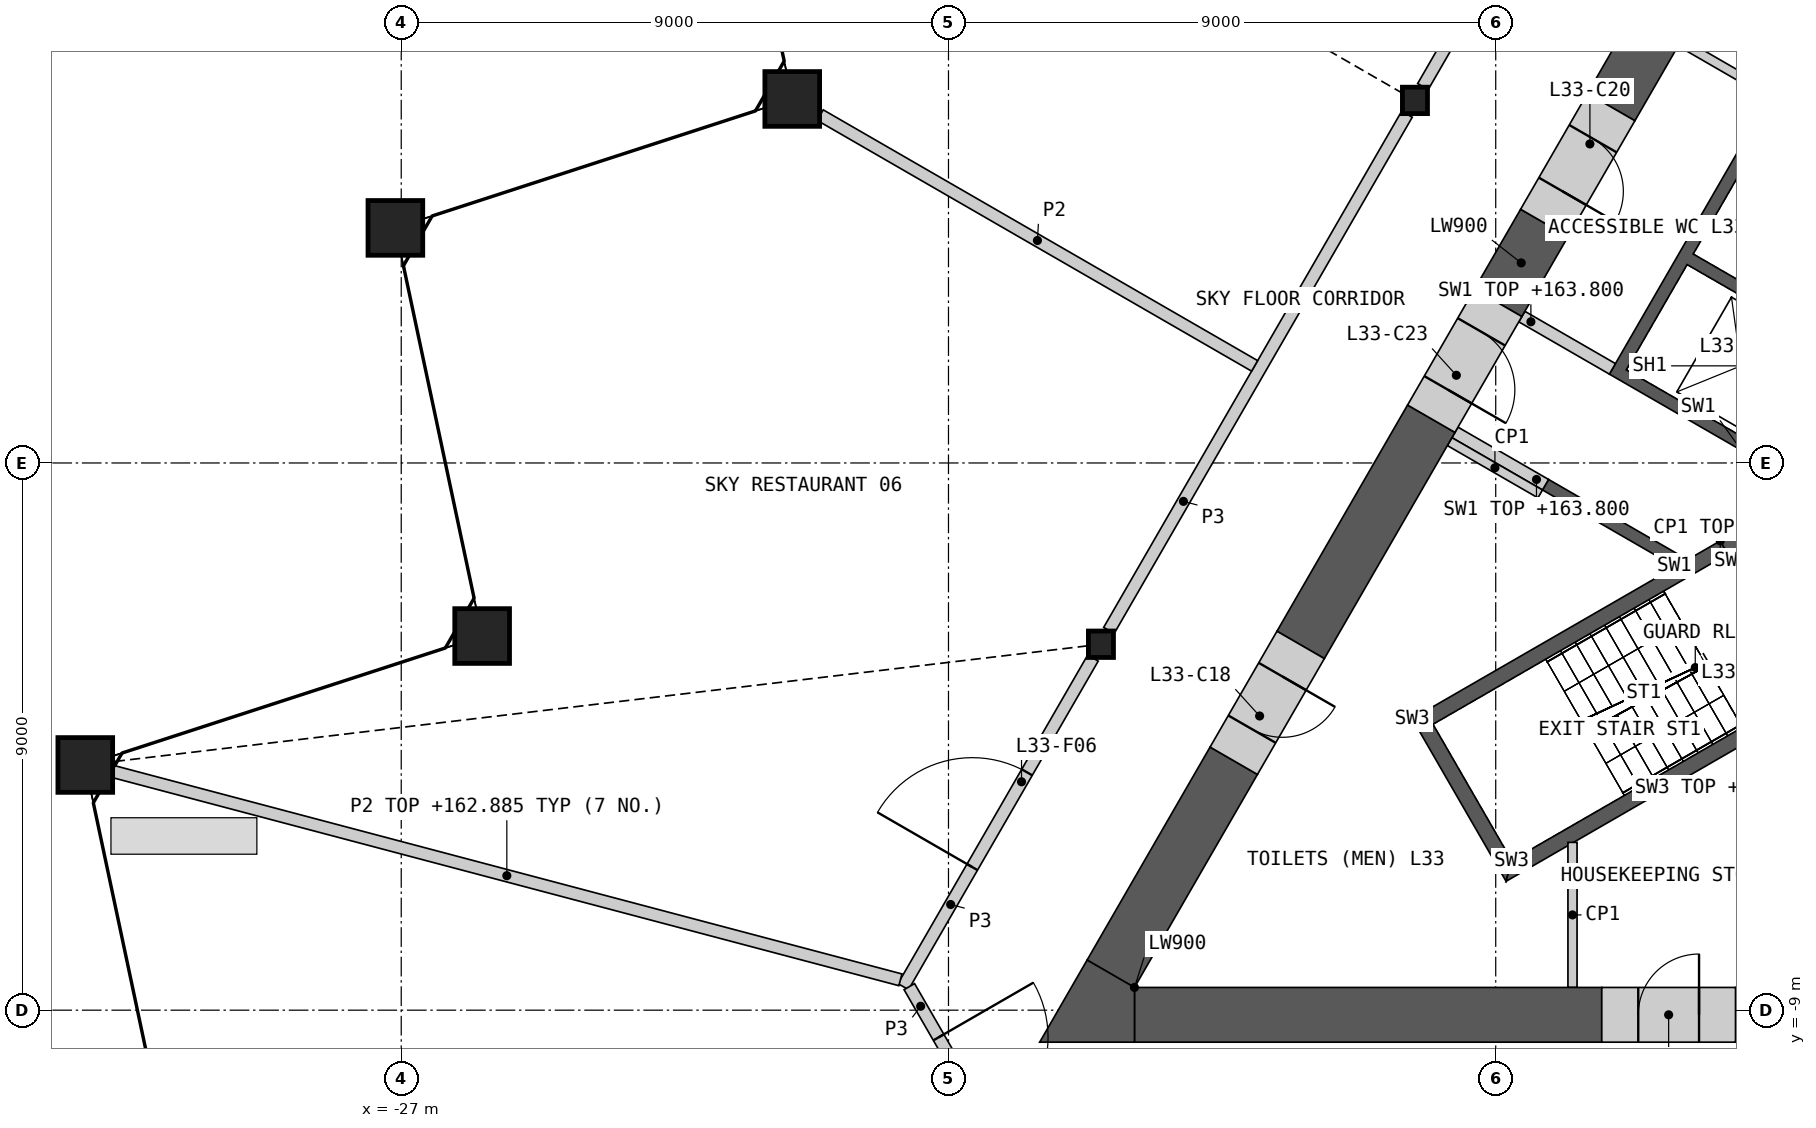
"""IFC4 building model, lengths in metres.
Left out: names, types, materials, properties, quantities, classifications, styles, units other than length and angle.
Written with IfcOpenShell. Run it as: python <this file> out.ifc"""

import sys

from ifc_helpers import new_model, si_unit, direction, frame, frame_2d, origin, origin_2d, place, context, subcontext, project, spatial, polyline, rectangle, hollow_rectangle, i_section, outline, extrude, element, fill, save


model = new_model("IFC4")
c1 = context("Model", 3, precision=1e-05, world=origin(), true_north=direction((0.0, 1.0)))
c2 = subcontext(c1, "Body", "Model", "MODEL_VIEW")
j1 = project(units=[si_unit("LENGTHUNIT", "METRE"), si_unit("PLANEANGLEUNIT", "RADIAN")], contexts=[c1])
p1 = place(None, origin())
s1 = spatial("IfcSite", under=j1, at=p1, CompositionType="ELEMENT")
p2 = place(p1, origin())
s2 = spatial("IfcBuilding", under=s1, at=p2, CompositionType="ELEMENT")
p3 = place(p2, frame((0.0, 0.0, 154.2)))
s3 = spatial("IfcBuildingStorey", under=s2, at=p3, CompositionType="ELEMENT", Elevation=154.2)
for number, where, z_axis, x_axis in (
    (1, (-20.57, 5.987, 0.0), (0.0, 0.0, 1.0), (1.0, 0.0, 0.0)),
    (2, (-27.096, 3.866, 0.0), (0.0, 0.0, 1.0), (1.0, 0.0, 0.0)),
    (3, (-25.669, -2.846, 0.0), (0.0, 0.0, 1.0), (1.0, 0.0, 0.0)),
    (4, (-32.196, -4.967, 0.0), (0.0, 0.0, 1.0), (1.0, 0.0, 0.0)),
):
    element("IfcColumn", number, at=place(p3, frame(where, z_axis=z_axis, x_axis=x_axis)), inside=s3, PredefinedType="COLUMN", context=c2, shape_type="SweptSolid", body=[
        extrude(hollow_rectangle(XDim=0.9, YDim=0.9, WallThickness=0.06, at=origin_2d()), origin(), (0.0, 0.0, 1.0), 10.0),
    ])
for number, where, z_axis, x_axis in (
    (5, (-10.328, 5.963, 0.0), (0.0, 0.0, 1.0), (1.0, 0.0, 0.0)),
    (6, (-15.493, -2.982, 0.0), (0.0, 0.0, 1.0), (1.0, 0.0, 0.0)),
):
    element("IfcColumn", number, at=place(p3, frame(where, z_axis=z_axis, x_axis=x_axis)), inside=s3, PredefinedType="COLUMN", context=c2, shape_type="SweptSolid", body=[
        extrude(i_section(OverallWidth=0.412, OverallDepth=0.435, WebThickness=0.036, FlangeThickness=0.057, at=origin_2d()), origin(), (0.0, 0.0, 1.0), 10.0),
    ])
p4 = place(p3, origin())
e7 = element("IfcWall", 7, at=p4, inside=s3, PredefinedType="SHEAR", context=c2, shape_type="SweptSolid", body=[
    extrude(outline(polyline([(-6.061, -1.697), (-8.231, -0.444), (-8.131, -0.271), (-5.96, -1.524), (-6.061, -1.697)])), origin(), (0.0, 0.0, 1.0), 9.6),
])
p5 = place(p3, origin())
e8 = element("IfcWall", 8, at=p5, inside=s3, PredefinedType="SHEAR", context=c2, shape_type="SweptSolid", body=[
    extrude(outline(polyline([(-4.96, 0.208), (-7.131, 1.461), (-3.731, 7.35), (-1.561, 6.097), (-1.66, 5.924), (-3.652, 7.074), (-4.652, 5.342), (-2.66, 4.192), (-2.76, 4.019), (-4.752, 5.169), (-5.752, 3.437), (-3.76, 2.287), (-3.861, 2.113), (-5.852, 3.263), (-6.852, 1.531), (-4.861, 0.381), (-4.96, 0.208)])), origin(), (0.0, 0.0, 1.0), 9.6),
])
for number, where, z_axis, x_axis in (
    (9, (-7.081, 1.548, 0.0), (0.0, 0.0, 1.0), (-0.866, 0.5, 0.0)),
    (10, (-8.181, -0.357, 0.0), (0.0, 0.0, 1.0), (-0.866, 0.5, 0.0)),
):
    element("IfcWall", number, at=place(p3, frame(where, z_axis=z_axis, x_axis=x_axis)), inside=s3, PredefinedType="SHEAR", context=c2, shape_type="SweptSolid", body=[
        extrude(rectangle(XDim=1.72, YDim=0.2, at=frame_2d((0.86, 0.0))), origin(), (0.0, 0.0, 1.0), 9.6),
    ])
p6 = place(p3, origin())
e11 = element("IfcWall", 11, at=p6, inside=s3, PredefinedType="SHEAR", context=c2, shape_type="SweptSolid", body=[
    extrude(outline(polyline([(-5.307, -1.281), (-10.374, -4.206), (-10.032, -4.298), (-5.182, -1.498), (-5.307, -1.281)])), origin(), (0.0, 0.0, 1.0), 9.6),
])
p7 = place(p3, origin())
e12 = element("IfcWall", 12, at=p7, inside=s3, PredefinedType="SHEAR", context=c2, shape_type="SweptSolid", body=[
    extrude(outline(polyline([(-10.374, -4.206), (-8.83, -6.881), (-8.738, -6.539), (-10.032, -4.298), (-10.374, -4.206)])), origin(), (0.0, 0.0, 1.0), 9.6),
])
p8 = place(p3, origin())
e13 = element("IfcWall", 13, at=p8, inside=s3, PredefinedType="SHEAR", context=c2, shape_type="SweptSolid", body=[
    extrude(outline(polyline([(-8.738, -6.539), (-8.83, -6.881), (-3.763, -3.956), (-3.888, -3.739), (-8.738, -6.539)])), origin(), (0.0, 0.0, 1.0), 9.6),
])
p9 = place(p3, frame((-5.199, -1.219, 0.0), z_axis=(0.0, 0.0, 1.0), x_axis=(0.499982516597, -0.866035497597, 0.0)))
e14 = element("IfcWall", 14, at=p9, inside=s3, PredefinedType="SHEAR", context=c2, shape_type="SweptSolid", body=[
    extrude(rectangle(XDim=3.088, YDim=0.25, at=frame_2d((1.544, 0.0))), origin(), (0.0, 0.0, 1.0), 9.6),
])
p10 = place(p9, frame((0.994, 0.0, 0.0)))
e15 = element("IfcOpeningElement", 15, at=p10, cuts=e14, PredefinedType="OPENING", context=c2, shape_type="SweptSolid", body=[
    extrude(rectangle(XDim=1.1, YDim=2.1, at=frame_2d((0.55, 1.05))), frame((0.0, 0.135, 0.0), z_axis=(0.0, -1.0, 0.0), x_axis=(1.0, 0.0, 0.0)), (0.0, 0.0, 1.0), 0.27),
])
for number, where, z_axis, x_axis in (
    (16, (-8.268, -0.509, 0.0), (0.0, 0.0, 1.0), (-0.866, 0.5, 0.0)),
    (17, (-5.964, 6.922, 0.0), (0.0, 0.0, 1.0), (0.866, -0.5, 0.0)),
):
    element("IfcWall", number, at=place(p3, frame(where, z_axis=z_axis, x_axis=x_axis)), inside=s3, PredefinedType="PARTITIONING", context=c2, shape_type="SweptSolid", body=[
        extrude(rectangle(XDim=1.72, YDim=0.15, at=frame_2d((0.86, 0.0))), origin(), (0.0, 0.0, 1.0), 9.6),
    ])
p11 = place(p3, frame((-7.737, -8.626, 0.0), z_axis=(0.0, 0.0, 1.0), x_axis=(0.0, 1.0, 0.0)))
e18 = element("IfcWall", 18, at=p11, inside=s3, PredefinedType="PARTITIONING", context=c2, shape_type="SweptSolid", body=[
    extrude(rectangle(XDim=2.386, YDim=0.15, at=frame_2d((1.193, 0.0))), origin(), (0.0, 0.0, 1.0), 9.6),
])
p12 = place(p3, frame((-5.056, -9.076, 0.0), z_axis=(0.0, 0.0, 1.0), x_axis=(1.0, 0.0, 0.0)))
e19 = element("IfcWall", 19, at=p12, inside=s3, PredefinedType="SHEAR", context=c2, shape_type="SweptSolid", body=[
    extrude(rectangle(XDim=9.177, YDim=0.9, at=frame_2d((4.588, 0.0))), origin(), (0.0, 0.0, 1.0), 9.6),
])
p13 = place(p3, frame((-14.941, -9.076, 0.0), z_axis=(0.0, 0.0, 1.0), x_axis=(1.0, 0.0, 0.0)))
e20 = element("IfcWall", 20, at=p13, inside=s3, PredefinedType="SHEAR", context=c2, shape_type="SweptSolid", body=[
    extrude(rectangle(XDim=7.685, YDim=0.9, at=frame_2d((3.843, 0.0))), origin(), (0.0, 0.0, 1.0), 9.6),
])
p14 = place(p3, frame((-10.06, 0.728, 0.0), z_axis=(0.0, 0.0, 1.0), x_axis=(-0.499996331799, -0.866027521611, 0.0)))
e21 = element("IfcWall", 21, at=p14, inside=s3, PredefinedType="SHEAR", context=c2, shape_type="SweptSolid", body=[
    extrude(rectangle(XDim=4.295, YDim=0.9, at=frame_2d((2.148, 0.0))), origin(), (0.0, 0.0, 1.0), 9.6),
])
p15 = place(p3, frame((-13.308, -4.898, 0.0), z_axis=(0.0, 0.0, 1.0), x_axis=(-0.499974938593, -0.866039872511, 0.0)))
e22 = element("IfcWall", 22, at=p15, inside=s3, PredefinedType="SHEAR", context=c2, shape_type="SweptSolid", body=[
    extrude(rectangle(XDim=4.046, YDim=0.9, at=frame_2d((2.023, 0.0))), origin(), (0.0, 0.0, 1.0), 9.6),
])
p16 = place(p3, frame((-5.996, 7.767, 0.0), z_axis=(0.0, 0.0, 1.0), x_axis=(-0.499990325971, -0.866030989016, 0.0)))
e23 = element("IfcWall", 23, at=p16, inside=s3, PredefinedType="SHEAR", context=c2, shape_type="SweptSolid", body=[
    extrude(rectangle(XDim=2.209, YDim=0.9, at=frame_2d((1.104, 0.0))), origin(), (0.0, 0.0, 1.0), 9.6),
])
p17 = place(p3, frame((-8.201, 3.948, 0.0), z_axis=(0.0, 0.0, 1.0), x_axis=(-0.499977585228, -0.866038344573, 0.0)))
e24 = element("IfcWall", 24, at=p17, inside=s3, PredefinedType="SHEAR", context=c2, shape_type="SweptSolid", body=[
    extrude(rectangle(XDim=1.519, YDim=0.9, at=frame_2d((0.759, 0.0))), origin(), (0.0, 0.0, 1.0), 9.6),
])
p18 = place(p3, origin())
e25 = element("IfcWall", 25, at=p18, inside=s3, PredefinedType="SHEAR", context=c2, shape_type="SweptSolid", body=[
    extrude(outline(polyline([(-14.941, -8.626), (-14.941, -9.526), (-16.5, -9.526), (-15.721, -8.176), (-14.941, -8.626)])), origin(), (0.0, 0.0, 1.0), 9.6),
])
p19 = place(p3, frame((-7.256, -9.076, 0.0), z_axis=(0.0, 0.0, 1.0), x_axis=(1.0, 0.0, 0.0)))
e26 = element("IfcWall", 26, at=p19, inside=s3, PredefinedType="SHEAR", context=c2, shape_type="SweptSolid", body=[
    extrude(rectangle(XDim=2.2, YDim=0.9, at=frame_2d((1.1, 0.0))), origin(), (0.0, 0.0, 1.0), 9.6),
])
p20 = place(p19, frame((0.6, 0.0, 0.0)))
e27 = element("IfcOpeningElement", 27, at=p20, cuts=e26, PredefinedType="OPENING", context=c2, shape_type="SweptSolid", body=[
    extrude(rectangle(XDim=1.0, YDim=2.1, at=frame_2d((0.5, 1.05))), frame((0.0, 0.46, 0.0), z_axis=(0.0, -1.0, 0.0), x_axis=(1.0, 0.0, 0.0)), (0.0, 0.0, 1.0), 0.92),
])
p21 = place(p3, frame((-12.208, -2.992, 0.0), z_axis=(0.0, 0.0, 1.0), x_axis=(-0.50002983664, -0.866008176907, 0.0)))
e28 = element("IfcWall", 28, at=p21, inside=s3, PredefinedType="SHEAR", context=c2, shape_type="SweptSolid", body=[
    extrude(rectangle(XDim=2.2, YDim=0.9, at=frame_2d((1.1, 0.0))), origin(), (0.0, 0.0, 1.0), 9.6),
])
p22 = place(p21, frame((0.6, 0.0, 0.0)))
e29 = element("IfcOpeningElement", 29, at=p22, cuts=e28, PredefinedType="OPENING", context=c2, shape_type="SweptSolid", body=[
    extrude(rectangle(XDim=1.0, YDim=2.1, at=frame_2d((0.5, 1.05))), frame((0.0, 0.46, 0.0), z_axis=(0.0, -1.0, 0.0), x_axis=(1.0, 0.0, 0.0)), (0.0, 0.0, 1.0), 0.92),
])
p23 = place(p3, frame((-7.101, 5.854, 0.0), z_axis=(0.0, 0.0, 1.0), x_axis=(-0.499898558967, -0.866083962871, 0.0)))
e30 = element("IfcWall", 30, at=p23, inside=s3, PredefinedType="SHEAR", context=c2, shape_type="SweptSolid", body=[
    extrude(rectangle(XDim=2.2, YDim=0.9, at=frame_2d((1.1, 0.0))), origin(), (0.0, 0.0, 1.0), 9.6),
])
p24 = place(p23, frame((0.6, 0.0, 0.0)))
e31 = element("IfcOpeningElement", 31, at=p24, cuts=e30, PredefinedType="OPENING", context=c2, shape_type="SweptSolid", body=[
    extrude(rectangle(XDim=1.0, YDim=2.1, at=frame_2d((0.5, 1.05))), frame((0.0, 0.46, 0.0), z_axis=(0.0, -1.0, 0.0), x_axis=(1.0, 0.0, 0.0)), (0.0, 0.0, 1.0), 0.92),
])
p25 = place(p3, frame((-8.96, 2.633, 0.0), z_axis=(0.0, 0.0, 1.0), x_axis=(-0.50002983664, -0.866008176907, 0.0)))
e32 = element("IfcWall", 32, at=p25, inside=s3, PredefinedType="SHEAR", context=c2, shape_type="SweptSolid", body=[
    extrude(rectangle(XDim=2.2, YDim=0.9, at=frame_2d((1.1, 0.0))), origin(), (0.0, 0.0, 1.0), 9.6),
])
p26 = place(p25, frame((0.55, 0.0, 0.0)))
e33 = element("IfcOpeningElement", 33, at=p26, cuts=e32, PredefinedType="OPENING", context=c2, shape_type="SweptSolid", body=[
    extrude(rectangle(XDim=1.1, YDim=2.1, at=frame_2d((0.55, 1.05))), frame((0.0, 0.46, 0.0), z_axis=(0.0, -1.0, 0.0), x_axis=(1.0, 0.0, 0.0)), (0.0, 0.0, 1.0), 0.92),
])
p27 = place(p3, frame((-15.361, -2.754, 0.0), z_axis=(0.0, 0.0, 1.0), x_axis=(0.500004141693, 0.866023012564, 0.0)))
e34 = element("IfcWall", 34, at=p27, inside=s3, PredefinedType="PARTITIONING", context=c2, shape_type="SweptSolid", body=[
    extrude(rectangle(XDim=9.803, YDim=0.2, at=frame_2d((4.902, 0.0))), origin(), (0.0, 0.0, 1.0), 9.6),
])
p28 = place(p3, frame((-10.197, 6.19, 0.0), z_axis=(0.0, 0.0, 1.0), x_axis=(0.500012035596, 0.866018454918, 0.0)))
e35 = element("IfcWall", 35, at=p28, inside=s3, PredefinedType="PARTITIONING", context=c2, shape_type="SweptSolid", body=[
    extrude(rectangle(XDim=9.803, YDim=0.2, at=frame_2d((4.902, 0.0))), origin(), (0.0, 0.0, 1.0), 9.6),
])
p29 = place(p28, frame((4.452, 0.0, 0.0)))
e36 = element("IfcOpeningElement", 36, at=p29, cuts=e35, PredefinedType="OPENING", context=c2, shape_type="SweptSolid", body=[
    extrude(rectangle(XDim=1.0, YDim=2.1, at=frame_2d((0.5, 1.05))), frame((0.0, 0.11, 0.0), z_axis=(0.0, -1.0, 0.0), x_axis=(1.0, 0.0, 0.0)), (0.0, 0.0, 1.0), 0.22),
])
p30 = place(p3, frame((-18.744, -8.613, 0.0), z_axis=(0.0, 0.0, 1.0), x_axis=(0.499997920671, 0.866026604282, 0.0)))
e37 = element("IfcWall", 37, at=p30, inside=s3, PredefinedType="PARTITIONING", context=c2, shape_type="SweptSolid", body=[
    extrude(rectangle(XDim=6.24, YDim=0.2, at=frame_2d((3.12, 0.0))), origin(), (0.0, 0.0, 1.0), 9.6),
])
p31 = place(p30, frame((2.271, 0.0, 0.0)))
e38 = element("IfcOpeningElement", 38, at=p31, cuts=e37, PredefinedType="OPENING", context=c2, shape_type="SweptSolid", body=[
    extrude(rectangle(XDim=1.8, YDim=2.1, at=frame_2d((0.9, 1.05))), frame((0.0, 0.11, 0.0), z_axis=(0.0, -1.0, 0.0), x_axis=(1.0, 0.0, 0.0)), (0.0, 0.0, 1.0), 0.22),
])
p32 = place(p3, frame((-18.644, -8.613, 0.0), z_axis=(0.0, 0.0, 1.0), x_axis=(0.499958791762, -0.866049194065, 0.0)))
e39 = element("IfcWall", 39, at=p32, inside=s3, PredefinedType="PARTITIONING", context=c2, shape_type="SweptSolid", body=[
    extrude(rectangle(XDim=3.726, YDim=0.2, at=frame_2d((1.863, 0.0))), origin(), (0.0, 0.0, 1.0), 9.6),
])
p33 = place(p32, frame((0.963, 0.0, 0.0)))
e40 = element("IfcOpeningElement", 40, at=p33, cuts=e39, PredefinedType="OPENING", context=c2, shape_type="SweptSolid", body=[
    extrude(rectangle(XDim=1.8, YDim=2.1, at=frame_2d((0.9, 1.05))), frame((0.0, 0.11, 0.0), z_axis=(0.0, -1.0, 0.0), x_axis=(1.0, 0.0, 0.0)), (0.0, 0.0, 1.0), 0.22),
])
p34 = place(p3, frame((-31.736, -5.075, 0.0), z_axis=(0.0, 0.0, 1.0), x_axis=(0.966727906646, -0.255806869555, 0.0)))
e41 = element("IfcWall", 41, at=p34, inside=s3, PredefinedType="PARTITIONING", context=c2, shape_type="SweptSolid", body=[
    extrude(rectangle(XDim=13.391, YDim=0.2, at=frame_2d((6.696, 0.0))), origin(), (0.0, 0.0, 1.0), 8.685),
])
p35 = place(p3, frame((-20.11, 5.721, 0.0), z_axis=(0.0, 0.0, 1.0), x_axis=(0.866032814021, -0.499987164874, 0.0)))
e42 = element("IfcWall", 42, at=p35, inside=s3, PredefinedType="PARTITIONING", context=c2, shape_type="SweptSolid", body=[
    extrude(rectangle(XDim=8.25, YDim=0.2, at=frame_2d((4.125, 0.0))), origin(), (0.0, 0.0, 1.0), 8.685),
])
p36 = place(p20, origin())
e43 = element("IfcDoor", 43, at=p36, inside=s3, OperationType="SINGLE_SWING_RIGHT", PredefinedType="DOOR", context=c2, shape_type="SweptSolid", body=[
    extrude(rectangle(XDim=1.0, YDim=2.1, at=frame_2d((0.5, 1.05))), frame((0.0, 0.205, 0.0), z_axis=(0.0, -1.0, 0.0), x_axis=(1.0, 0.0, 0.0)), (0.0, 0.0, 1.0), 0.05),
])
fill(e27, e43)
p37 = place(p22, origin())
e44 = element("IfcDoor", 44, at=p37, inside=s3, OperationType="SINGLE_SWING_LEFT", PredefinedType="DOOR", context=c2, shape_type="SweptSolid", body=[
    extrude(rectangle(XDim=1.0, YDim=2.1, at=frame_2d((0.5, 1.05))), frame((0.0, 0.205, 0.0), z_axis=(0.0, -1.0, 0.0), x_axis=(1.0, 0.0, 0.0)), (0.0, 0.0, 1.0), 0.05),
])
fill(e29, e44)
p38 = place(p24, origin())
e45 = element("IfcDoor", 45, at=p38, inside=s3, OperationType="SINGLE_SWING_RIGHT", PredefinedType="DOOR", context=c2, shape_type="SweptSolid", body=[
    extrude(rectangle(XDim=1.0, YDim=2.1, at=frame_2d((0.5, 1.05))), frame((0.0, 0.205, 0.0), z_axis=(0.0, -1.0, 0.0), x_axis=(1.0, 0.0, 0.0)), (0.0, 0.0, 1.0), 0.05),
])
fill(e31, e45)
p39 = place(p26, origin())
e46 = element("IfcDoor", 46, at=p39, inside=s3, OperationType="SINGLE_SWING_RIGHT", PredefinedType="DOOR", context=c2, shape_type="SweptSolid", body=[
    extrude(rectangle(XDim=1.1, YDim=2.1, at=frame_2d((0.55, 1.05))), frame((0.0, 0.205, 0.0), z_axis=(0.0, -1.0, 0.0), x_axis=(1.0, 0.0, 0.0)), (0.0, 0.0, 1.0), 0.05),
])
fill(e33, e46)
p40 = place(p31, origin())
e47 = element("IfcDoor", 47, at=p40, inside=s3, OperationType="DOUBLE_DOOR_SINGLE_SWING", PredefinedType="DOOR", context=c2, shape_type="SweptSolid", body=[
    extrude(rectangle(XDim=1.8, YDim=2.1, at=frame_2d((0.9, 1.05))), frame((0.0, 0.025, 0.0), z_axis=(0.0, -1.0, 0.0), x_axis=(1.0, 0.0, 0.0)), (0.0, 0.0, 1.0), 0.05),
])
fill(e38, e47)
p41 = place(p33, origin())
e48 = element("IfcDoor", 48, at=p41, inside=s3, OperationType="DOUBLE_DOOR_SINGLE_SWING", PredefinedType="DOOR", context=c2, shape_type="SweptSolid", body=[
    extrude(rectangle(XDim=1.8, YDim=2.1, at=frame_2d((0.9, 1.05))), frame((0.0, 0.025, 0.0), z_axis=(0.0, -1.0, 0.0), x_axis=(1.0, 0.0, 0.0)), (0.0, 0.0, 1.0), 0.05),
])
fill(e40, e48)
save(model, sys.argv[1])
